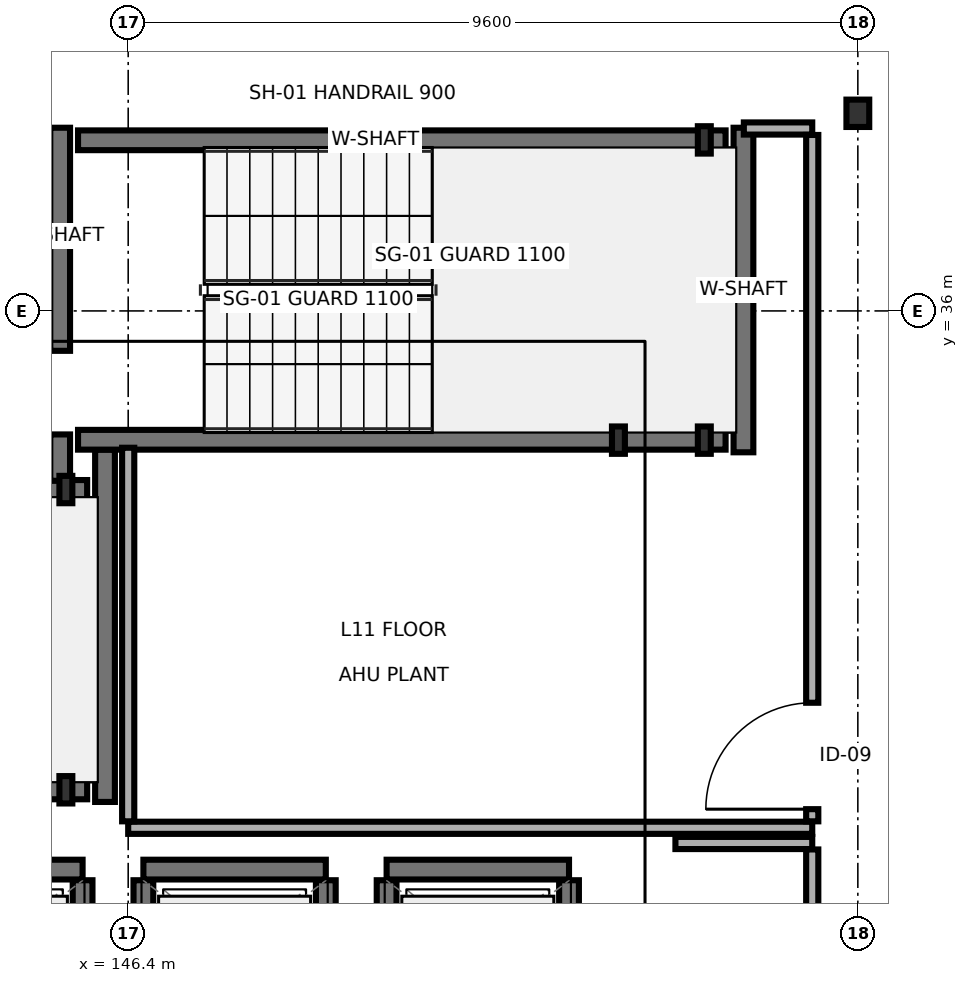
"""IFC4 building model, lengths in metres.
Left out: names, types, materials, properties, quantities, classifications, styles, units other than length and angle.
Written with IfcOpenShell. Run it as: python <this file> out.ifc"""

import sys

from ifc_helpers import new_model, si_unit, direction, frame, frame_2d, origin, origin_2d, place, context, subcontext, project, spatial, rectangle, i_section, extrude, element, fill, save


model = new_model("IFC4")
c1 = context("Model", 3, precision=1e-05, world=origin(), true_north=direction((0.0, 1.0)))
c2 = subcontext(c1, "Body", "Model", "MODEL_VIEW")
j1 = project(units=[si_unit("LENGTHUNIT", "METRE"), si_unit("PLANEANGLEUNIT", "RADIAN")], contexts=[c1])
p1 = place(None, origin())
s1 = spatial("IfcSite", under=j1, at=p1, CompositionType="ELEMENT")
p2 = place(p1, origin())
s2 = spatial("IfcBuilding", under=s1, at=p2, CompositionType="ELEMENT")
p3 = place(p2, frame((0.0, 0.0, 38.5)))
s3 = spatial("IfcBuildingStorey", under=s2, at=p3, CompositionType="ELEMENT", Elevation=38.5)
for number, where, z_axis, x_axis in (
    (1, (145.58, 29.7, 0.0), (0.0, 0.0, 1.0), (1.0, 0.0, 0.0)),
    (2, (145.58, 33.65, 0.0), (0.0, 0.0, 1.0), (1.0, 0.0, 0.0)),
    (3, (152.85, 34.3, 0.0), (0.0, 0.0, 1.0), (1.0, 0.0, 0.0)),
    (4, (153.98, 34.3, 0.0), (0.0, 0.0, 1.0), (1.0, 0.0, 0.0)),
    (5, (153.98, 38.25, 0.0), (0.0, 0.0, 1.0), (1.0, 0.0, 0.0)),
):
    element("IfcColumn", number, at=place(p3, frame(where, z_axis=z_axis, x_axis=x_axis)), inside=s3, PredefinedType="PILASTER", context=c2, shape_type="SweptSolid", body=[
        extrude(i_section(OverallWidth=0.17, OverallDepth=0.36, WebThickness=0.008, FlangeThickness=0.013, FilletRadius=0.018, at=origin_2d()), origin(), (0.0, 0.0, 1.0), 3.4),
    ])
p4 = place(p3, frame((156.0, 38.6, 0.0), z_axis=(0.0, 0.0, 1.0), x_axis=(1.0, 0.0, 0.0)))
e6 = element("IfcColumn", 6, at=p4, inside=s3, PredefinedType="COLUMN", context=c2, shape_type="SweptSolid", body=[
    extrude(i_section(OverallWidth=0.3, OverallDepth=0.36, WebThickness=0.012, FlangeThickness=0.022, FilletRadius=0.027, at=origin_2d()), origin(), (0.0, 0.0, 1.0), 3.4),
])
p5 = place(p3, frame((146.095, 29.54, 0.0), z_axis=(0.0, 0.0, 1.0), x_axis=(0.0, 1.0, 0.0)))
e7 = element("IfcWall", 7, at=p5, inside=s3, PredefinedType="SHEAR", context=c2, shape_type="SweptSolid", body=[
    extrude(rectangle(XDim=4.635, YDim=0.26, at=frame_2d((2.317, 0.0))), origin(), (0.0, 0.0, 1.0), 3.15),
])
for number, where, z_axis, x_axis in (
    (8, (137.34, 29.705, 0.0), (0.0, 0.0, 1.0), (1.0, 0.0, 0.0)),
    (9, (137.34, 33.645, 0.0), (0.0, 0.0, 1.0), (1.0, 0.0, 0.0)),
):
    element("IfcWall", number, at=place(p3, frame(where, z_axis=z_axis, x_axis=x_axis)), inside=s3, PredefinedType="SHEAR", context=c2, shape_type="SweptSolid", body=[
        extrude(rectangle(XDim=8.52, YDim=0.26, at=frame_2d((4.26, 0.0))), origin(), (0.0, 0.0, 1.0), 3.15),
    ])
p6 = place(p3, frame((145.505, 33.765, 0.0), z_axis=(0.0, 0.0, 1.0), x_axis=(0.0, 1.0, 0.0)))
e10 = element("IfcWall", 10, at=p6, inside=s3, PredefinedType="SHEAR", context=c2, shape_type="SweptSolid", body=[
    extrude(rectangle(XDim=4.645, YDim=0.26, at=frame_2d((2.323, 0.0))), origin(), (0.0, 0.0, 1.0), 3.15),
])
p7 = place(p6, frame((0.61, 0.0, 0.0)))
e11 = element("IfcOpeningElement", 11, at=p7, cuts=e10, PredefinedType="OPENING", context=c2, shape_type="SweptSolid", body=[
    extrude(rectangle(XDim=1.1, YDim=2.2, at=frame_2d((0.55, 1.1))), frame((0.0, 0.14, 0.0), z_axis=(0.0, -1.0, 0.0), x_axis=(1.0, 0.0, 0.0)), (0.0, 0.0, 1.0), 0.28),
])
p8 = place(p3, frame((154.495, 34.14, 0.0), z_axis=(0.0, 0.0, 1.0), x_axis=(0.0, 1.0, 0.0)))
e12 = element("IfcWall", 12, at=p8, inside=s3, PredefinedType="SHEAR", context=c2, shape_type="SweptSolid", body=[
    extrude(rectangle(XDim=4.27, YDim=0.26, at=frame_2d((2.135, 0.0))), origin(), (0.0, 0.0, 1.0), 3.15),
])
for number, where, z_axis, x_axis in (
    (13, (145.74, 34.305, 0.0), (0.0, 0.0, 1.0), (1.0, 0.0, 0.0)),
    (14, (145.74, 38.245, 0.0), (0.0, 0.0, 1.0), (1.0, 0.0, 0.0)),
):
    element("IfcWall", number, at=place(p3, frame(where, z_axis=z_axis, x_axis=x_axis)), inside=s3, PredefinedType="SHEAR", context=c2, shape_type="SweptSolid", body=[
        extrude(rectangle(XDim=8.52, YDim=0.26, at=frame_2d((4.26, 0.0))), origin(), (0.0, 0.0, 1.0), 3.15),
    ])
p9 = place(p3, frame((143.4, 28.65, 0.0), z_axis=(0.0, 0.0, 1.0), x_axis=(1.0, 0.0, 0.0)))
e15 = element("IfcWall", 15, at=p9, inside=s3, PredefinedType="SHEAR", context=c2, shape_type="SweptSolid", body=[
    extrude(rectangle(XDim=2.4, YDim=0.26, at=frame_2d((1.2, 0.0))), origin(), (0.0, 0.0, 1.0), 3.15),
])
p10 = place(p3, frame((145.8, 26.69, 0.0), z_axis=(0.0, 0.0, 1.0), x_axis=(0.0, 1.0, 0.0)))
e16 = element("IfcWall", 16, at=p10, inside=s3, PredefinedType="SHEAR", context=c2, shape_type="SweptSolid", body=[
    extrude(rectangle(XDim=1.82, YDim=0.26, at=frame_2d((0.91, 0.0))), origin(), (0.0, 0.0, 1.0), 3.15),
])
p11 = place(p3, frame((146.6, 28.65, 0.0), z_axis=(0.0, 0.0, 1.0), x_axis=(1.0, 0.0, 0.0)))
e17 = element("IfcWall", 17, at=p11, inside=s3, PredefinedType="SHEAR", context=c2, shape_type="SweptSolid", body=[
    extrude(rectangle(XDim=2.4, YDim=0.26, at=frame_2d((1.2, 0.0))), origin(), (0.0, 0.0, 1.0), 3.15),
])
for number, where, z_axis, x_axis in (
    (18, (146.6, 26.69, 0.0), (0.0, 0.0, 1.0), (0.0, 1.0, 0.0)),
    (19, (149.0, 26.69, 0.0), (0.0, 0.0, 1.0), (0.0, 1.0, 0.0)),
):
    element("IfcWall", number, at=place(p3, frame(where, z_axis=z_axis, x_axis=x_axis)), inside=s3, PredefinedType="SHEAR", context=c2, shape_type="SweptSolid", body=[
        extrude(rectangle(XDim=1.82, YDim=0.26, at=frame_2d((0.91, 0.0))), origin(), (0.0, 0.0, 1.0), 3.15),
    ])
p12 = place(p3, frame((149.8, 28.65, 0.0), z_axis=(0.0, 0.0, 1.0), x_axis=(1.0, 0.0, 0.0)))
e20 = element("IfcWall", 20, at=p12, inside=s3, PredefinedType="SHEAR", context=c2, shape_type="SweptSolid", body=[
    extrude(rectangle(XDim=2.4, YDim=0.26, at=frame_2d((1.2, 0.0))), origin(), (0.0, 0.0, 1.0), 3.15),
])
for number, where, z_axis, x_axis in (
    (21, (149.8, 26.69, 0.0), (0.0, 0.0, 1.0), (0.0, 1.0, 0.0)),
    (22, (152.2, 26.69, 0.0), (0.0, 0.0, 1.0), (0.0, 1.0, 0.0)),
):
    element("IfcWall", number, at=place(p3, frame(where, z_axis=z_axis, x_axis=x_axis)), inside=s3, PredefinedType="SHEAR", context=c2, shape_type="SweptSolid", body=[
        extrude(rectangle(XDim=1.82, YDim=0.26, at=frame_2d((0.91, 0.0))), origin(), (0.0, 0.0, 1.0), 3.15),
    ])
p13 = place(p3, frame((146.4, 29.2, 0.0), z_axis=(0.0, 0.0, 1.0), x_axis=(1.0, 0.0, 0.0)))
e23 = element("IfcWall", 23, at=p13, inside=s3, PredefinedType="PARTITIONING", context=c2, shape_type="SweptSolid", body=[
    extrude(rectangle(XDim=9.0, YDim=0.16, at=frame_2d((4.5, 0.0))), origin(), (0.0, 0.0, 1.0), 3.15),
])
p14 = place(p3, frame((146.4, 29.285, 0.0), z_axis=(0.0, 0.0, 1.0), x_axis=(0.0, 1.0, 0.0)))
e24 = element("IfcWall", 24, at=p14, inside=s3, PredefinedType="PARTITIONING", context=c2, shape_type="SweptSolid", body=[
    extrude(rectangle(XDim=4.915, YDim=0.16, at=frame_2d((2.458, 0.0))), origin(), (0.0, 0.0, 1.0), 3.15),
])
p15 = place(p3, frame((154.5, 38.4, 0.0), z_axis=(0.0, 0.0, 1.0), x_axis=(1.0, 0.0, 0.0)))
e25 = element("IfcWall", 25, at=p15, inside=s3, PredefinedType="PARTITIONING", context=c2, shape_type="SweptSolid", body=[
    extrude(rectangle(XDim=0.9, YDim=0.16, at=frame_2d((0.45, 0.0))), origin(), (0.0, 0.0, 1.0), 2.685),
])
p16 = place(p3, frame((155.4, 29.285, 0.0), z_axis=(0.0, 0.0, 1.0), x_axis=(0.0, 1.0, 0.0)))
e26 = element("IfcWall", 26, at=p16, inside=s3, PredefinedType="PARTITIONING", context=c2, shape_type="SweptSolid", body=[
    extrude(rectangle(XDim=9.03, YDim=0.16, at=frame_2d((4.515, 0.0))), origin(), (0.0, 0.0, 1.0), 3.15),
])
p17 = place(p16, frame((0.16, 0.0, 0.0)))
e27 = element("IfcOpeningElement", 27, at=p17, cuts=e26, PredefinedType="OPENING", context=c2, shape_type="SweptSolid", body=[
    extrude(rectangle(XDim=1.4, YDim=2.2, at=frame_2d((0.7, 1.1))), frame((0.0, 0.09, 0.0), z_axis=(0.0, -1.0, 0.0), x_axis=(1.0, 0.0, 0.0)), (0.0, 0.0, 1.0), 0.18),
])
p18 = place(p3, frame((153.6, 29.0, 0.0), z_axis=(0.0, 0.0, 1.0), x_axis=(1.0, 0.0, 0.0)))
e28 = element("IfcWall", 28, at=p18, inside=s3, PredefinedType="PARTITIONING", context=c2, shape_type="SweptSolid", body=[
    extrude(rectangle(XDim=1.8, YDim=0.16, at=frame_2d((0.9, 0.0))), origin(), (0.0, 0.0, 1.0), 3.15),
])
p19 = place(p3, frame((155.4, 16.885, 0.0), z_axis=(0.0, 0.0, 1.0), x_axis=(0.0, 1.0, 0.0)))
e29 = element("IfcWall", 29, at=p19, inside=s3, PredefinedType="PARTITIONING", context=c2, shape_type="SweptSolid", body=[
    extrude(rectangle(XDim=12.03, YDim=0.16, at=frame_2d((6.015, 0.0))), origin(), (0.0, 0.0, 1.0), 2.685),
])
p20 = place(p19, frame((5.365, 0.0, 0.0)))
e30 = element("IfcOpeningElement", 30, at=p20, cuts=e29, PredefinedType="OPENING", context=c2, shape_type="SweptSolid", body=[
    extrude(rectangle(XDim=1.3, YDim=2.2, at=frame_2d((0.65, 1.1))), frame((0.0, 0.09, 0.0), z_axis=(0.0, -1.0, 0.0), x_axis=(1.0, 0.0, 0.0)), (0.0, 0.0, 1.0), 0.18),
])
p21 = place(p7, origin())
e31 = element("IfcDoor", 31, at=p21, inside=s3, OperationType="SINGLE_SWING_RIGHT", PredefinedType="DOOR", context=c2, shape_type="SweptSolid", body=[
    extrude(rectangle(XDim=1.1, YDim=2.2, at=frame_2d((0.55, 1.1))), frame((0.0, 0.025, 0.0), z_axis=(0.0, -1.0, 0.0), x_axis=(1.0, 0.0, 0.0)), (0.0, 0.0, 1.0), 0.05),
])
fill(e11, e31)
p22 = place(p17, origin())
e32 = element("IfcDoor", 32, at=p22, inside=s3, OperationType="SINGLE_SWING_LEFT", PredefinedType="DOOR", context=c2, shape_type="SweptSolid", body=[
    extrude(rectangle(XDim=1.4, YDim=2.2, at=frame_2d((0.7, 1.1))), frame((0.0, 0.025, 0.0), z_axis=(0.0, -1.0, 0.0), x_axis=(1.0, 0.0, 0.0)), (0.0, 0.0, 1.0), 0.05),
])
fill(e27, e32)
save(model, sys.argv[1])
